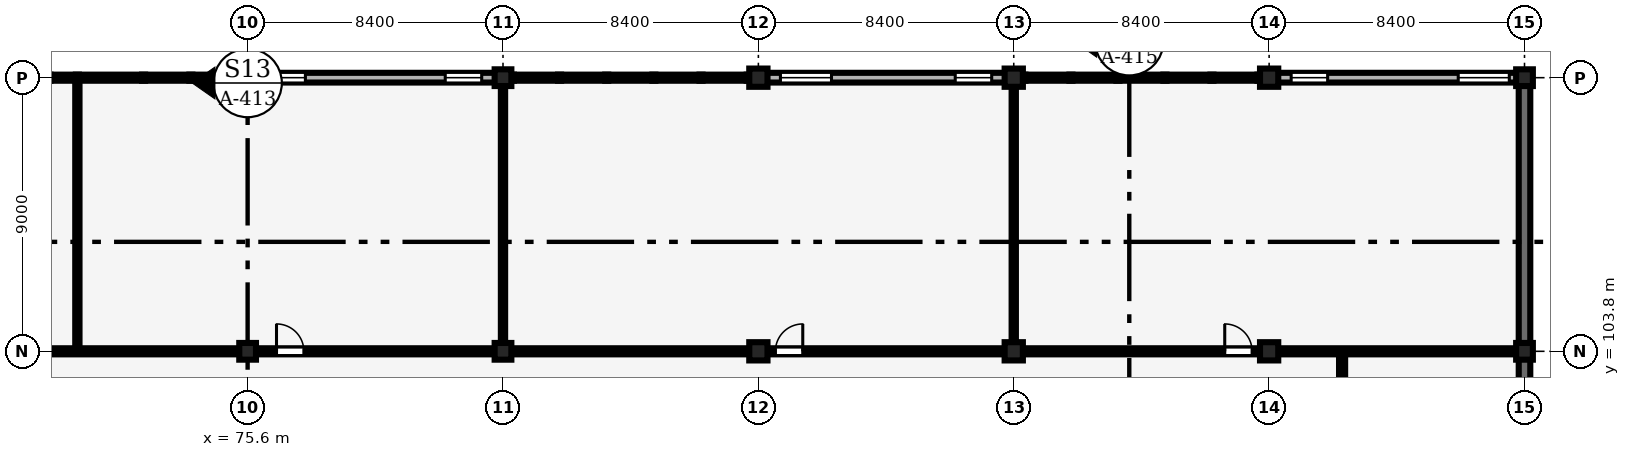
"""IFC4 building model, lengths in metres.
Left out: names, types, materials, properties, quantities, classifications, styles, units other than length and angle.
Written with IfcOpenShell. Run it as: python <this file> out.ifc"""

import sys

from ifc_helpers import new_model, si_unit, direction, frame, frame_2d, origin, origin_2d, place, context, subcontext, project, spatial, rectangle, extrude, element, fill, save


model = new_model("IFC4")
c1 = context("Model", 3, precision=1e-05, world=origin(), true_north=direction((0.0, 1.0)))
c2 = subcontext(c1, "Body", "Model", "MODEL_VIEW")
j1 = project(units=[si_unit("LENGTHUNIT", "METRE"), si_unit("PLANEANGLEUNIT", "RADIAN")], contexts=[c1])
p1 = place(None, origin())
s1 = spatial("IfcSite", under=j1, at=p1, CompositionType="ELEMENT")
p2 = place(p1, origin())
s2 = spatial("IfcBuilding", under=s1, at=p2, CompositionType="ELEMENT")
p3 = place(p2, frame((0.0, 0.0, 9.0)))
s3 = spatial("IfcBuildingStorey", under=s2, at=p3, CompositionType="ELEMENT", Elevation=9.0)
for number, where, z_axis, x_axis in (
    (1, (75.6, 103.8, 0.0), (0.0, 0.0, 1.0), (1.0, 0.0, 0.0)),
    (2, (75.6, 112.8, 0.0), (0.0, 0.0, 1.0), (1.0, 0.0, 0.0)),
    (3, (84.0, 103.8, 0.0), (0.0, 0.0, 1.0), (1.0, 0.0, 0.0)),
    (4, (84.0, 112.8, 0.0), (0.0, 0.0, 1.0), (1.0, 0.0, 0.0)),
):
    element("IfcColumn", number, at=place(p3, frame(where, z_axis=z_axis, x_axis=x_axis)), inside=s3, PredefinedType="COLUMN", context=c2, shape_type="SweptSolid", body=[
        extrude(rectangle(XDim=0.55, YDim=0.55, at=origin_2d()), origin(), (0.0, 0.0, 1.0), 4.2),
    ])
for number, where, z_axis, x_axis in (
    (5, (92.4, 103.8, 0.0), (0.0, 0.0, 1.0), (1.0, 0.0, 0.0)),
    (6, (92.4, 112.8, 0.0), (0.0, 0.0, 1.0), (1.0, 0.0, 0.0)),
    (7, (100.8, 103.8, 0.0), (0.0, 0.0, 1.0), (1.0, 0.0, 0.0)),
    (8, (100.8, 112.8, 0.0), (0.0, 0.0, 1.0), (1.0, 0.0, 0.0)),
    (9, (109.2, 103.8, 0.0), (0.0, 0.0, 1.0), (1.0, 0.0, 0.0)),
    (10, (109.2, 112.8, 0.0), (0.0, 0.0, 1.0), (1.0, 0.0, 0.0)),
):
    element("IfcColumn", number, at=place(p3, frame(where, z_axis=z_axis, x_axis=x_axis)), inside=s3, PredefinedType="COLUMN", context=c2, shape_type="SweptSolid", body=[
        extrude(rectangle(XDim=0.6, YDim=0.6, at=origin_2d()), origin(), (0.0, 0.0, 1.0), 4.2),
    ])
for number, where, z_axis, x_axis in (
    (11, (117.6, 103.8, 0.0), (0.0, 0.0, 1.0), (1.0, 0.0, 0.0)),
    (12, (117.6, 112.8, 0.0), (0.0, 0.0, 1.0), (1.0, 0.0, 0.0)),
):
    element("IfcColumn", number, at=place(p3, frame(where, z_axis=z_axis, x_axis=x_axis)), inside=s3, PredefinedType="COLUMN", context=c2, shape_type="SweptSolid", body=[
        extrude(rectangle(XDim=0.55, YDim=0.55, at=origin_2d()), origin(), (0.0, 0.0, 1.0), 4.2),
    ])
p4 = place(p3, frame((117.6, 95.05, 0.0), z_axis=(0.0, 0.0, 1.0), x_axis=(0.0, 1.0, 0.0)))
e13 = element("IfcWall", 13, at=p4, inside=s3, PredefinedType="SHEAR", context=c2, shape_type="SweptSolid", body=[
    extrude(rectangle(XDim=8.5, YDim=0.38, at=frame_2d((4.25, 0.0))), origin(), (0.0, 0.0, 1.0), 3.11),
])
p5 = place(p3, frame((117.6, 104.05, 0.0), z_axis=(0.0, 0.0, 1.0), x_axis=(0.0, 1.0, 0.0)))
e14 = element("IfcWall", 14, at=p5, inside=s3, PredefinedType="SHEAR", context=c2, shape_type="SweptSolid", body=[
    extrude(rectangle(XDim=8.5, YDim=0.38, at=frame_2d((4.25, 0.0))), origin(), (0.0, 0.0, 1.0), 3.06),
])
p6 = place(p3, frame((75.85, 112.8, 0.0), z_axis=(0.0, 0.0, 1.0), x_axis=(1.0, 0.0, 0.0)))
e15 = element("IfcWall", 15, at=p6, inside=s3, PredefinedType="SOLIDWALL", context=c2, shape_type="SweptSolid", body=[
    extrude(rectangle(XDim=7.9, YDim=0.32, at=frame_2d((3.95, 0.0))), origin(), (0.0, 0.0, 1.0), 3.26),
])
p7 = place(p6, frame((0.45, 0.0, 0.9)))
e16 = element("IfcOpeningElement", 16, at=p7, cuts=e15, PredefinedType="OPENING", context=c2, shape_type="SweptSolid", body=[
    extrude(rectangle(XDim=1.2, YDim=1.5, at=frame_2d((0.6, 0.75))), frame((0.0, 0.17, 0.0), z_axis=(0.0, -1.0, 0.0), x_axis=(1.0, 0.0, 0.0)), (0.0, 0.0, 1.0), 0.34),
])
p8 = place(p6, frame((6.25, 0.0, 0.9)))
e17 = element("IfcOpeningElement", 17, at=p8, cuts=e15, PredefinedType="OPENING", context=c2, shape_type="SweptSolid", body=[
    extrude(rectangle(XDim=1.2, YDim=1.8, at=frame_2d((0.6, 0.9))), frame((0.0, 0.17, 0.0), z_axis=(0.0, -1.0, 0.0), x_axis=(1.0, 0.0, 0.0)), (0.0, 0.0, 1.0), 0.34),
])
p9 = place(p3, frame((92.675, 112.8, 0.0), z_axis=(0.0, 0.0, 1.0), x_axis=(1.0, 0.0, 0.0)))
e18 = element("IfcWall", 18, at=p9, inside=s3, PredefinedType="SOLIDWALL", context=c2, shape_type="SweptSolid", body=[
    extrude(rectangle(XDim=7.85, YDim=0.32, at=frame_2d((3.925, 0.0))), origin(), (0.0, 0.0, 1.0), 3.26),
])
p10 = place(p9, frame((0.45, 0.0, 0.9)))
e19 = element("IfcOpeningElement", 19, at=p10, cuts=e18, PredefinedType="OPENING", context=c2, shape_type="SweptSolid", body=[
    extrude(rectangle(XDim=1.68, YDim=2.21, at=frame_2d((0.84, 1.105))), frame((0.0, 0.17, 0.0), z_axis=(0.0, -1.0, 0.0), x_axis=(1.0, 0.0, 0.0)), (0.0, 0.0, 1.0), 0.34),
])
p11 = place(p9, frame((6.2, 0.0, 0.9)))
e20 = element("IfcOpeningElement", 20, at=p11, cuts=e18, PredefinedType="OPENING", context=c2, shape_type="SweptSolid", body=[
    extrude(rectangle(XDim=1.2, YDim=1.5, at=frame_2d((0.6, 0.75))), frame((0.0, 0.17, 0.0), z_axis=(0.0, -1.0, 0.0), x_axis=(1.0, 0.0, 0.0)), (0.0, 0.0, 1.0), 0.34),
])
p12 = place(p3, frame((109.475, 112.8, 0.0), z_axis=(0.0, 0.0, 1.0), x_axis=(1.0, 0.0, 0.0)))
e21 = element("IfcWall", 21, at=p12, inside=s3, PredefinedType="SOLIDWALL", context=c2, shape_type="SweptSolid", body=[
    extrude(rectangle(XDim=7.875, YDim=0.32, at=frame_2d((3.938, 0.0))), origin(), (0.0, 0.0, 1.0), 3.16),
])
p13 = place(p12, frame((0.45, 0.0, 0.9)))
e22 = element("IfcOpeningElement", 22, at=p13, cuts=e21, PredefinedType="OPENING", context=c2, shape_type="SweptSolid", body=[
    extrude(rectangle(XDim=1.2, YDim=1.8, at=frame_2d((0.6, 0.9))), frame((0.0, 0.17, 0.0), z_axis=(0.0, -1.0, 0.0), x_axis=(1.0, 0.0, 0.0)), (0.0, 0.0, 1.0), 0.34),
])
p14 = place(p12, frame((5.945, 0.0, 0.9)))
e23 = element("IfcOpeningElement", 23, at=p14, cuts=e21, PredefinedType="OPENING", context=c2, shape_type="SweptSolid", body=[
    extrude(rectangle(XDim=1.68, YDim=2.11, at=frame_2d((0.84, 1.055))), frame((0.0, 0.17, 0.0), z_axis=(0.0, -1.0, 0.0), x_axis=(1.0, 0.0, 0.0)), (0.0, 0.0, 1.0), 0.34),
])
p15 = place(p3, frame((111.6, 101.01, 0.0), z_axis=(0.0, 0.0, 1.0), x_axis=(0.0, 1.0, 0.0)))
e24 = element("IfcWall", 24, at=p15, inside=s3, PredefinedType="PARTITIONING", context=c2, shape_type="SweptSolid", body=[
    extrude(rectangle(XDim=2.78, YDim=0.2, at=frame_2d((1.39, 0.0))), origin(), (0.0, 0.0, 1.0), 3.9),
])
p16 = place(p15, frame((0.94, 0.0, 0.0)))
e25 = element("IfcOpeningElement", 25, at=p16, cuts=e24, PredefinedType="OPENING", context=c2, shape_type="SweptSolid", body=[
    extrude(rectangle(XDim=0.9, YDim=2.1, at=frame_2d((0.45, 1.05))), frame((0.0, 0.11, 0.0), z_axis=(0.0, -1.0, 0.0), x_axis=(1.0, 0.0, 0.0)), (0.0, 0.0, 1.0), 0.22),
])
p17 = place(p3, frame((70.0, 103.905, 0.0), z_axis=(0.0, 0.0, 1.0), x_axis=(0.0, 1.0, 0.0)))
e26 = element("IfcWall", 26, at=p17, inside=s3, PredefinedType="PARTITIONING", context=c2, shape_type="SweptSolid", body=[
    extrude(rectangle(XDim=8.79, YDim=0.14, at=frame_2d((4.395, 0.0))), origin(), (0.0, 0.0, 1.0), 3.9),
])
p18 = place(p3, frame((84.0, 103.905, 0.0), z_axis=(0.0, 0.0, 1.0), x_axis=(0.0, 1.0, 0.0)))
e27 = element("IfcWall", 27, at=p18, inside=s3, PredefinedType="PARTITIONING", context=c2, shape_type="SweptSolid", body=[
    extrude(rectangle(XDim=8.73, YDim=0.14, at=frame_2d((4.365, 0.0))), origin(), (0.0, 0.0, 1.0), 3.11),
])
p19 = place(p3, frame((100.8, 103.905, 0.0), z_axis=(0.0, 0.0, 1.0), x_axis=(0.0, 1.0, 0.0)))
e28 = element("IfcWall", 28, at=p19, inside=s3, PredefinedType="PARTITIONING", context=c2, shape_type="SweptSolid", body=[
    extrude(rectangle(XDim=8.73, YDim=0.14, at=frame_2d((4.365, 0.0))), origin(), (0.0, 0.0, 1.0), 2.96),
])
p20 = place(p3, frame((67.485, 103.8, 0.0), z_axis=(0.0, 0.0, 1.0), x_axis=(1.0, 0.0, 0.0)))
e29 = element("IfcWall", 29, at=p20, inside=s3, PredefinedType="PARTITIONING", context=c2, shape_type="SweptSolid", body=[
    extrude(rectangle(XDim=7.83, YDim=0.2, at=frame_2d((3.915, 0.0))), origin(), (0.0, 0.0, 1.0), 3.11),
])
p21 = place(p3, frame((75.885, 103.8, 0.0), z_axis=(0.0, 0.0, 1.0), x_axis=(1.0, 0.0, 0.0)))
e30 = element("IfcWall", 30, at=p21, inside=s3, PredefinedType="PARTITIONING", context=c2, shape_type="SweptSolid", body=[
    extrude(rectangle(XDim=7.83, YDim=0.2, at=frame_2d((3.915, 0.0))), origin(), (0.0, 0.0, 1.0), 3.06),
])
p22 = place(p21, frame((0.665, 0.0, 0.0)))
e31 = element("IfcOpeningElement", 31, at=p22, cuts=e30, PredefinedType="OPENING", context=c2, shape_type="SweptSolid", body=[
    extrude(rectangle(XDim=0.9, YDim=2.1, at=frame_2d((0.45, 1.05))), frame((0.0, 0.11, 0.0), z_axis=(0.0, -1.0, 0.0), x_axis=(1.0, 0.0, 0.0)), (0.0, 0.0, 1.0), 0.22),
])
p23 = place(p3, frame((84.285, 103.8, 0.0), z_axis=(0.0, 0.0, 1.0), x_axis=(1.0, 0.0, 0.0)))
e32 = element("IfcWall", 32, at=p23, inside=s3, PredefinedType="PARTITIONING", context=c2, shape_type="SweptSolid", body=[
    extrude(rectangle(XDim=7.805, YDim=0.2, at=frame_2d((3.903, 0.0))), origin(), (0.0, 0.0, 1.0), 3.01),
])
p24 = place(p3, frame((92.71, 103.8, 0.0), z_axis=(0.0, 0.0, 1.0), x_axis=(1.0, 0.0, 0.0)))
e33 = element("IfcWall", 33, at=p24, inside=s3, PredefinedType="PARTITIONING", context=c2, shape_type="SweptSolid", body=[
    extrude(rectangle(XDim=7.78, YDim=0.2, at=frame_2d((3.89, 0.0))), origin(), (0.0, 0.0, 1.0), 3.01),
])
p25 = place(p24, frame((0.25, 0.0, 0.0)))
e34 = element("IfcOpeningElement", 34, at=p25, cuts=e33, PredefinedType="OPENING", context=c2, shape_type="SweptSolid", body=[
    extrude(rectangle(XDim=0.9, YDim=2.1, at=frame_2d((0.45, 1.05))), frame((0.0, 0.11, 0.0), z_axis=(0.0, -1.0, 0.0), x_axis=(1.0, 0.0, 0.0)), (0.0, 0.0, 1.0), 0.22),
])
p26 = place(p3, frame((101.11, 103.8, 0.0), z_axis=(0.0, 0.0, 1.0), x_axis=(1.0, 0.0, 0.0)))
e35 = element("IfcWall", 35, at=p26, inside=s3, PredefinedType="PARTITIONING", context=c2, shape_type="SweptSolid", body=[
    extrude(rectangle(XDim=7.78, YDim=0.2, at=frame_2d((3.89, 0.0))), origin(), (0.0, 0.0, 1.0), 2.96),
])
p27 = place(p26, frame((6.63, 0.0, 0.0)))
e36 = element("IfcOpeningElement", 36, at=p27, cuts=e35, PredefinedType="OPENING", context=c2, shape_type="SweptSolid", body=[
    extrude(rectangle(XDim=0.9, YDim=2.1, at=frame_2d((0.45, 1.05))), frame((0.0, 0.11, 0.0), z_axis=(0.0, -1.0, 0.0), x_axis=(1.0, 0.0, 0.0)), (0.0, 0.0, 1.0), 0.22),
])
p28 = place(p3, frame((109.51, 103.8, 0.0), z_axis=(0.0, 0.0, 1.0), x_axis=(1.0, 0.0, 0.0)))
e37 = element("IfcWall", 37, at=p28, inside=s3, PredefinedType="PARTITIONING", context=c2, shape_type="SweptSolid", body=[
    extrude(rectangle(XDim=7.895, YDim=0.2, at=frame_2d((3.948, 0.0))), origin(), (0.0, 0.0, 1.0), 2.91),
])
p29 = place(p7, origin())
e38 = element("IfcWindow", 38, at=p29, inside=s3, PartitioningType="SINGLE_PANEL", PredefinedType="WINDOW", context=c2, shape_type="SweptSolid", body=[
    extrude(rectangle(XDim=1.2, YDim=1.5, at=frame_2d((0.6, 0.75))), frame((0.0, 0.03, 0.0), z_axis=(0.0, -1.0, 0.0), x_axis=(1.0, 0.0, 0.0)), (0.0, 0.0, 1.0), 0.06),
])
fill(e16, e38)
p30 = place(p8, origin())
e39 = element("IfcWindow", 39, at=p30, inside=s3, PartitioningType="SINGLE_PANEL", PredefinedType="WINDOW", context=c2, shape_type="SweptSolid", body=[
    extrude(rectangle(XDim=1.2, YDim=1.8, at=frame_2d((0.6, 0.9))), frame((0.0, 0.03, 0.0), z_axis=(0.0, -1.0, 0.0), x_axis=(1.0, 0.0, 0.0)), (0.0, 0.0, 1.0), 0.06),
])
fill(e17, e39)
p31 = place(p10, origin())
e40 = element("IfcWindow", 40, at=p31, inside=s3, PartitioningType="SINGLE_PANEL", PredefinedType="WINDOW", context=c2, shape_type="SweptSolid", body=[
    extrude(rectangle(XDim=1.68, YDim=2.21, at=frame_2d((0.84, 1.105))), frame((0.0, 0.03, 0.0), z_axis=(0.0, -1.0, 0.0), x_axis=(1.0, 0.0, 0.0)), (0.0, 0.0, 1.0), 0.06),
])
fill(e19, e40)
p32 = place(p11, origin())
e41 = element("IfcWindow", 41, at=p32, inside=s3, PartitioningType="SINGLE_PANEL", PredefinedType="WINDOW", context=c2, shape_type="SweptSolid", body=[
    extrude(rectangle(XDim=1.2, YDim=1.5, at=frame_2d((0.6, 0.75))), frame((0.0, 0.03, 0.0), z_axis=(0.0, -1.0, 0.0), x_axis=(1.0, 0.0, 0.0)), (0.0, 0.0, 1.0), 0.06),
])
fill(e20, e41)
p33 = place(p13, origin())
e42 = element("IfcWindow", 42, at=p33, inside=s3, PartitioningType="SINGLE_PANEL", PredefinedType="WINDOW", context=c2, shape_type="SweptSolid", body=[
    extrude(rectangle(XDim=1.2, YDim=1.8, at=frame_2d((0.6, 0.9))), frame((0.0, 0.03, 0.0), z_axis=(0.0, -1.0, 0.0), x_axis=(1.0, 0.0, 0.0)), (0.0, 0.0, 1.0), 0.06),
])
fill(e22, e42)
p34 = place(p14, origin())
e43 = element("IfcWindow", 43, at=p34, inside=s3, PartitioningType="SINGLE_PANEL", PredefinedType="WINDOW", context=c2, shape_type="SweptSolid", body=[
    extrude(rectangle(XDim=1.68, YDim=2.11, at=frame_2d((0.84, 1.055))), frame((0.0, 0.03, 0.0), z_axis=(0.0, -1.0, 0.0), x_axis=(1.0, 0.0, 0.0)), (0.0, 0.0, 1.0), 0.06),
])
fill(e23, e43)
p35 = place(p22, origin())
e44 = element("IfcDoor", 44, at=p35, inside=s3, OperationType="SINGLE_SWING_LEFT", PredefinedType="DOOR", context=c2, shape_type="SweptSolid", body=[
    extrude(rectangle(XDim=0.9, YDim=2.1, at=frame_2d((0.45, 1.05))), frame((0.0, 0.025, 0.0), z_axis=(0.0, -1.0, 0.0), x_axis=(1.0, 0.0, 0.0)), (0.0, 0.0, 1.0), 0.05),
])
fill(e31, e44)
p36 = place(p25, origin())
e45 = element("IfcDoor", 45, at=p36, inside=s3, OperationType="SINGLE_SWING_RIGHT", PredefinedType="DOOR", context=c2, shape_type="SweptSolid", body=[
    extrude(rectangle(XDim=0.9, YDim=2.1, at=frame_2d((0.45, 1.05))), frame((0.0, 0.025, 0.0), z_axis=(0.0, -1.0, 0.0), x_axis=(1.0, 0.0, 0.0)), (0.0, 0.0, 1.0), 0.05),
])
fill(e34, e45)
p37 = place(p27, origin())
e46 = element("IfcDoor", 46, at=p37, inside=s3, OperationType="SINGLE_SWING_LEFT", PredefinedType="DOOR", context=c2, shape_type="SweptSolid", body=[
    extrude(rectangle(XDim=0.9, YDim=2.1, at=frame_2d((0.45, 1.05))), frame((0.0, 0.025, 0.0), z_axis=(0.0, -1.0, 0.0), x_axis=(1.0, 0.0, 0.0)), (0.0, 0.0, 1.0), 0.05),
])
fill(e36, e46)
save(model, sys.argv[1])
